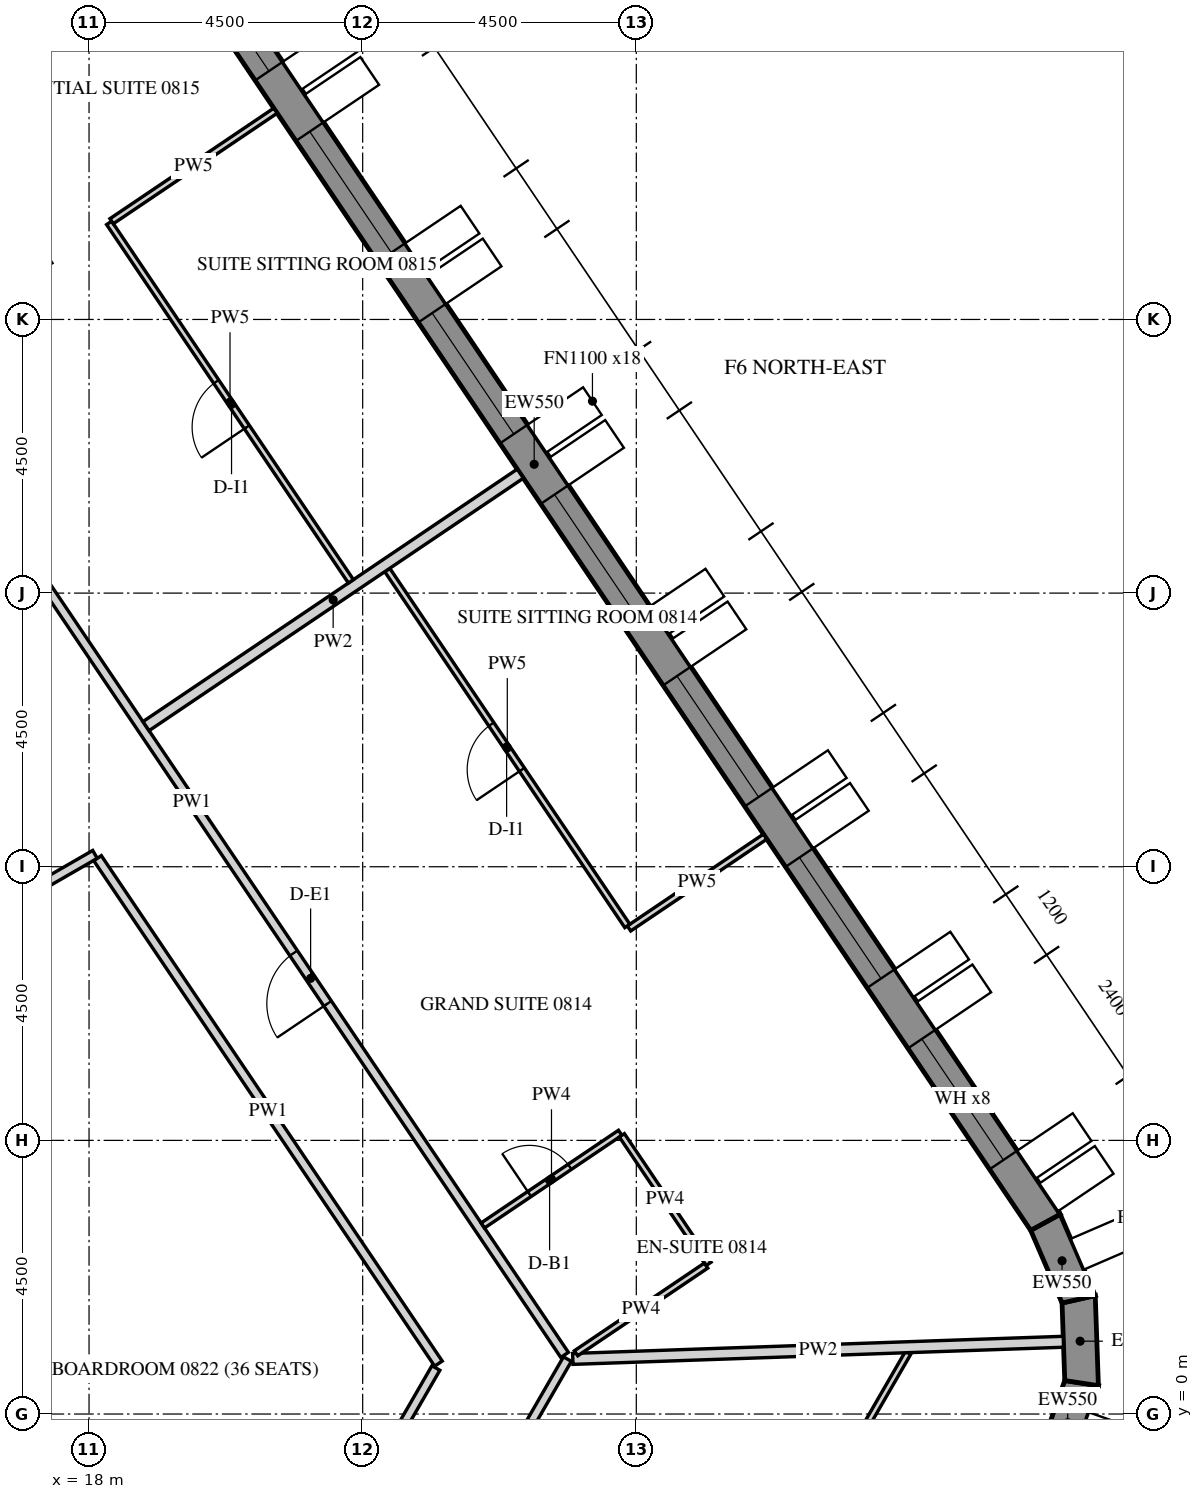
"""IFC4 building model, lengths in metres.
Left out: names, types, materials, properties, quantities, classifications, styles, units other than length and angle.
Written with IfcOpenShell. Run it as: python <this file> out.ifc"""

import sys

from ifc_helpers import new_model, si_unit, direction, frame, frame_2d, origin, place, context, subcontext, project, spatial, polyline, rectangle, outline, extrude, element, fill, save


model = new_model("IFC4")
c1 = context("Model", 3, precision=1e-05, world=origin(), true_north=direction((0.0, 1.0)))
c2 = subcontext(c1, "Body", "Model", "MODEL_VIEW")
j1 = project(units=[si_unit("LENGTHUNIT", "METRE"), si_unit("PLANEANGLEUNIT", "RADIAN")], contexts=[c1])
p1 = place(None, origin())
s1 = spatial("IfcSite", under=j1, at=p1, CompositionType="ELEMENT")
p2 = place(p1, origin())
s2 = spatial("IfcBuilding", under=s1, at=p2, CompositionType="ELEMENT")
p3 = place(p2, frame((0.0, 0.0, 111.6)))
s3 = spatial("IfcBuildingStorey", under=s2, at=p3, CompositionType="ELEMENT", Elevation=111.6)
p4 = place(p3, frame((33.866, -0.792, -0.15), z_axis=(0.0, 0.0, 1.0), x_axis=(0.33111537203, 0.943590276765, 0.0)))
e1 = element("IfcWall", 1, at=p4, inside=s3, PredefinedType="SOLIDWALL", context=c2, shape_type="SweptSolid", body=[
    extrude(outline(polyline([(-0.026, -0.275), (1.431, -0.275), (1.327, 0.275), (0.026, 0.275), (-0.026, -0.275)])), origin(), (0.0, 0.0, 1.0), 3.9),
])
p5 = place(p3, frame((34.323, 0.509, -0.15), z_axis=(0.0, 0.0, 1.0), x_axis=(-0.034876908462, 0.999391615562, 0.0)))
e2 = element("IfcWall", 2, at=p5, inside=s3, PredefinedType="SOLIDWALL", context=c2, shape_type="SweptSolid", body=[
    extrude(outline(polyline([(-0.052, -0.275), (1.431, -0.275), (1.327, 0.275), (0.052, 0.275), (-0.052, -0.275)])), origin(), (0.0, 0.0, 1.0), 3.9),
])
p6 = place(p3, frame((34.274, 1.887, -0.15), z_axis=(0.0, 0.0, 1.0), x_axis=(-0.396161342798, 0.918180913803, 0.0)))
e3 = element("IfcWall", 3, at=p6, inside=s3, PredefinedType="SOLIDWALL", context=c2, shape_type="SweptSolid", body=[
    extrude(outline(polyline([(-0.052, -0.275), (1.405, -0.275), (1.354, 0.275), (0.052, 0.275), (-0.052, -0.275)])), origin(), (0.0, 0.0, 1.0), 3.9),
])
p7 = place(p3, frame((33.728, 3.153, -0.15), z_axis=(0.0, 0.0, 1.0), x_axis=(-0.559192411416, 0.82903790445, 0.0)))
e4 = element("IfcWall", 4, at=p7, inside=s3, PredefinedType="SOLIDWALL", context=c2, shape_type="SweptSolid", body=[
    extrude(outline(polyline([(-0.026, -0.275), (30.093, -0.275), (30.048, 0.275), (0.026, 0.275), (-0.026, -0.275)])), origin(), (0.0, 0.0, 1.0), 3.9),
])
p8 = place(p7, frame((1.236, 0.0, 1.05)))
e5 = element("IfcOpeningElement", 5, at=p8, cuts=e4, PredefinedType="OPENING", context=c2, shape_type="SweptSolid", body=[
    extrude(rectangle(XDim=2.4, YDim=2.4, at=frame_2d((1.2, 1.2))), frame((0.0, 0.285, 0.0), z_axis=(0.0, -1.0, 0.0), x_axis=(1.0, 0.0, 0.0)), (0.0, 0.0, 1.0), 0.57),
])
p9 = place(p7, frame((4.835, 0.0, 1.05)))
e6 = element("IfcOpeningElement", 6, at=p9, cuts=e4, PredefinedType="OPENING", context=c2, shape_type="SweptSolid", body=[
    extrude(rectangle(XDim=2.4, YDim=2.4, at=frame_2d((1.2, 1.2))), frame((0.0, 0.285, 0.0), z_axis=(0.0, -1.0, 0.0), x_axis=(1.0, 0.0, 0.0)), (0.0, 0.0, 1.0), 0.57),
])
p10 = place(p7, frame((8.436, 0.0, 1.05)))
e7 = element("IfcOpeningElement", 7, at=p10, cuts=e4, PredefinedType="OPENING", context=c2, shape_type="SweptSolid", body=[
    extrude(rectangle(XDim=2.4, YDim=2.4, at=frame_2d((1.2, 1.2))), frame((0.0, 0.285, 0.0), z_axis=(0.0, -1.0, 0.0), x_axis=(1.0, 0.0, 0.0)), (0.0, 0.0, 1.0), 0.57),
])
p11 = place(p7, frame((12.035, 0.0, 1.05)))
e8 = element("IfcOpeningElement", 8, at=p11, cuts=e4, PredefinedType="OPENING", context=c2, shape_type="SweptSolid", body=[
    extrude(rectangle(XDim=2.4, YDim=2.4, at=frame_2d((1.2, 1.2))), frame((0.0, 0.285, 0.0), z_axis=(0.0, -1.0, 0.0), x_axis=(1.0, 0.0, 0.0)), (0.0, 0.0, 1.0), 0.57),
])
p12 = place(p7, frame((15.635, 0.0, 1.05)))
e9 = element("IfcOpeningElement", 9, at=p12, cuts=e4, PredefinedType="OPENING", context=c2, shape_type="SweptSolid", body=[
    extrude(rectangle(XDim=2.4, YDim=2.4, at=frame_2d((1.2, 1.2))), frame((0.0, 0.285, 0.0), z_axis=(0.0, -1.0, 0.0), x_axis=(1.0, 0.0, 0.0)), (0.0, 0.0, 1.0), 0.57),
])
p13 = place(p7, frame((19.236, 0.0, 1.05)))
e10 = element("IfcOpeningElement", 10, at=p13, cuts=e4, PredefinedType="OPENING", context=c2, shape_type="SweptSolid", body=[
    extrude(rectangle(XDim=2.4, YDim=2.4, at=frame_2d((1.2, 1.2))), frame((0.0, 0.285, 0.0), z_axis=(0.0, -1.0, 0.0), x_axis=(1.0, 0.0, 0.0)), (0.0, 0.0, 1.0), 0.57),
])
p14 = place(p7, frame((22.835, 0.0, 1.05)))
e11 = element("IfcOpeningElement", 11, at=p14, cuts=e4, PredefinedType="OPENING", context=c2, shape_type="SweptSolid", body=[
    extrude(rectangle(XDim=2.4, YDim=2.4, at=frame_2d((1.2, 1.2))), frame((0.0, 0.285, 0.0), z_axis=(0.0, -1.0, 0.0), x_axis=(1.0, 0.0, 0.0)), (0.0, 0.0, 1.0), 0.57),
])
p15 = place(p7, frame((26.436, 0.0, 1.05)))
e12 = element("IfcOpeningElement", 12, at=p15, cuts=e4, PredefinedType="OPENING", context=c2, shape_type="SweptSolid", body=[
    extrude(rectangle(XDim=2.4, YDim=2.4, at=frame_2d((1.2, 1.2))), frame((0.0, 0.285, 0.0), z_axis=(0.0, -1.0, 0.0), x_axis=(1.0, 0.0, 0.0)), (0.0, 0.0, 1.0), 0.57),
])
p16 = place(p3, frame((13.928, -19.775, 0.0), z_axis=(0.0, 0.0, 1.0), x_axis=(0.50000450071, 0.866022805283, 0.0)))
e13 = element("IfcWall", 13, at=p16, inside=s3, PredefinedType="PARTITIONING", context=c2, shape_type="SweptSolid", body=[
    extrude(rectangle(XDim=23.877, YDim=0.15, at=frame_2d((11.938, 0.0))), origin(), (0.0, 0.0, 1.0), 2.988),
])
p17 = place(p16, frame((3.843, 0.0, 0.0)))
e14 = element("IfcOpeningElement", 14, at=p17, cuts=e13, PredefinedType="OPENING", context=c2, shape_type="SweptSolid", body=[
    extrude(rectangle(XDim=1.0, YDim=2.1, at=frame_2d((0.5, 1.05))), frame((0.0, 0.085, 0.0), z_axis=(0.0, -1.0, 0.0), x_axis=(1.0, 0.0, 0.0)), (0.0, 0.0, 1.0), 0.17),
])
p18 = place(p16, frame((18.425, 0.0, 0.0)))
e15 = element("IfcOpeningElement", 15, at=p18, cuts=e13, PredefinedType="OPENING", context=c2, shape_type="SweptSolid", body=[
    extrude(rectangle(XDim=1.0, YDim=2.1, at=frame_2d((0.5, 1.05))), frame((0.0, 0.085, 0.0), z_axis=(0.0, -1.0, 0.0), x_axis=(1.0, 0.0, 0.0)), (0.0, 0.0, 1.0), 0.17),
])
p19 = place(p3, frame((25.821, 0.972, 0.0), z_axis=(0.0, 0.0, 1.0), x_axis=(-0.559192946342, 0.829037543638, 0.0)))
e16 = element("IfcWall", 16, at=p19, inside=s3, PredefinedType="PARTITIONING", context=c2, shape_type="SweptSolid", body=[
    extrude(rectangle(XDim=21.918, YDim=0.15, at=frame_2d((10.959, 0.0))), origin(), (0.0, 0.0, 1.0), 2.988),
])
p20 = place(p19, frame((6.969, 0.0, 0.0)))
e17 = element("IfcOpeningElement", 17, at=p20, cuts=e16, PredefinedType="OPENING", context=c2, shape_type="SweptSolid", body=[
    extrude(rectangle(XDim=1.0, YDim=2.1, at=frame_2d((0.5, 1.05))), frame((0.0, 0.085, 0.0), z_axis=(0.0, -1.0, 0.0), x_axis=(1.0, 0.0, 0.0)), (0.0, 0.0, 1.0), 0.17),
])
p21 = place(p19, frame((15.511, 0.0, 0.0)))
e18 = element("IfcOpeningElement", 18, at=p21, cuts=e16, PredefinedType="OPENING", context=c2, shape_type="SweptSolid", body=[
    extrude(rectangle(XDim=1.0, YDim=2.1, at=frame_2d((0.5, 1.05))), frame((0.0, 0.085, 0.0), z_axis=(0.0, -1.0, 0.0), x_axis=(1.0, 0.0, 0.0)), (0.0, 0.0, 1.0), 0.17),
])
p22 = place(p3, frame((12.664, 6.066, 0.0), z_axis=(0.0, 0.0, 1.0), x_axis=(0.866036561919, 0.499980673046, 0.0)))
e19 = element("IfcWall", 19, at=p22, inside=s3, PredefinedType="PARTITIONING", context=c2, shape_type="SweptSolid", body=[
    extrude(rectangle(XDim=6.275, YDim=0.15, at=frame_2d((3.137, 0.0))), origin(), (0.0, 0.0, 1.0), 2.988),
])
p23 = place(p3, frame((18.14, 9.141, 0.0), z_axis=(0.0, 0.0, 1.0), x_axis=(0.55918799196, -0.829040885389, 0.0)))
e20 = element("IfcWall", 20, at=p23, inside=s3, PredefinedType="PARTITIONING", context=c2, shape_type="SweptSolid", body=[
    extrude(rectangle(XDim=10.025, YDim=0.15, at=frame_2d((5.013, 0.0))), origin(), (0.0, 0.0, 1.0), 2.988),
])
p24 = place(p3, frame((23.704, 0.757, 0.0), z_axis=(0.0, 0.0, 1.0), x_axis=(-0.500010297365, -0.866019458516, 0.0)))
e21 = element("IfcWall", 21, at=p24, inside=s3, PredefinedType="PARTITIONING", context=c2, shape_type="SweptSolid", body=[
    extrude(rectangle(XDim=11.429, YDim=0.15, at=frame_2d((5.714, 0.0))), origin(), (0.0, 0.0, 1.0), 2.988),
])
p25 = place(p24, frame((5.264, 0.0, 0.0)))
e22 = element("IfcOpeningElement", 22, at=p25, cuts=e21, PredefinedType="OPENING", context=c2, shape_type="SweptSolid", body=[
    extrude(rectangle(XDim=0.9, YDim=2.1, at=frame_2d((0.45, 1.05))), frame((0.0, 0.085, 0.0), z_axis=(0.0, -1.0, 0.0), x_axis=(1.0, 0.0, 0.0)), (0.0, 0.0, 1.0), 0.17),
])
p26 = place(p3, frame((27.397, -6.048, 0.0), z_axis=(0.0, 0.0, 1.0), x_axis=(0.49998354646, 0.866034903032, 0.0)))
e23 = element("IfcWall", 23, at=p26, inside=s3, PredefinedType="PARTITIONING", context=c2, shape_type="SweptSolid", body=[
    extrude(rectangle(XDim=8.148, YDim=0.1, at=frame_2d((4.074, 0.0))), origin(), (0.0, 0.0, 1.0), 2.988),
])
p27 = place(p26, frame((3.1, 0.0, 0.0)))
e24 = element("IfcOpeningElement", 24, at=p27, cuts=e23, PredefinedType="OPENING", context=c2, shape_type="SweptSolid", body=[
    extrude(rectangle(XDim=0.9, YDim=2.1, at=frame_2d((0.45, 1.05))), frame((0.0, 0.06, 0.0), z_axis=(0.0, -1.0, 0.0), x_axis=(1.0, 0.0, 0.0)), (0.0, 0.0, 1.0), 0.12),
])
p28 = place(p3, frame((34.023, 1.188, 0.0), z_axis=(0.0, 0.0, 1.0), x_axis=(-0.999390818315, -0.03489974594, 0.0)))
e25 = element("IfcWall", 25, at=p28, inside=s3, PredefinedType="PARTITIONING", context=c2, shape_type="SweptSolid", body=[
    extrude(rectangle(XDim=8.073, YDim=0.18, at=frame_2d((4.036, 0.0))), origin(), (0.0, 0.0, 1.0), 2.988),
])
p29 = place(p3, frame((24.476, 3.101, 0.0), z_axis=(0.0, 0.0, 1.0), x_axis=(0.829047014003, 0.559178905694, 0.0)))
e26 = element("IfcWall", 26, at=p29, inside=s3, PredefinedType="PARTITIONING", context=c2, shape_type="SweptSolid", body=[
    extrude(rectangle(XDim=2.725, YDim=0.1, at=frame_2d((1.362, 0.0))), origin(), (0.0, 0.0, 1.0), 2.988),
])
p30 = place(p29, frame((0.925, 0.0, 0.0)))
e27 = element("IfcOpeningElement", 27, at=p30, cuts=e26, PredefinedType="OPENING", context=c2, shape_type="SweptSolid", body=[
    extrude(rectangle(XDim=0.8, YDim=2.1, at=frame_2d((0.4, 1.05))), frame((0.0, 0.06, 0.0), z_axis=(0.0, -1.0, 0.0), x_axis=(1.0, 0.0, 0.0)), (0.0, 0.0, 1.0), 0.12),
])
p31 = place(p3, frame((26.762, 4.583, 0.0), z_axis=(0.0, 0.0, 1.0), x_axis=(0.559221247909, -0.829018453285, 0.0)))
e28 = element("IfcWall", 28, at=p31, inside=s3, PredefinedType="PARTITIONING", context=c2, shape_type="SweptSolid", body=[
    extrude(rectangle(XDim=2.55, YDim=0.1, at=frame_2d((1.275, 0.0))), origin(), (0.0, 0.0, 1.0), 2.988),
])
p32 = place(p3, frame((28.147, 2.441, 0.0), z_axis=(0.0, 0.0, 1.0), x_axis=(-0.829023136679, -0.559214304941, 0.0)))
e29 = element("IfcWall", 29, at=p32, inside=s3, PredefinedType="PARTITIONING", context=c2, shape_type="SweptSolid", body=[
    extrude(rectangle(XDim=2.579, YDim=0.1, at=frame_2d((1.29, 0.0))), origin(), (0.0, 0.0, 1.0), 2.988),
])
p33 = place(p3, frame((29.119, 9.495, 0.0), z_axis=(0.0, 0.0, 1.0), x_axis=(-0.829061405999, -0.559157567313, 0.0)))
e30 = element("IfcWall", 30, at=p33, inside=s3, PredefinedType="PARTITIONING", context=c2, shape_type="SweptSolid", body=[
    extrude(rectangle(XDim=2.7, YDim=0.1, at=frame_2d((1.35, 0.0))), origin(), (0.0, 0.0, 1.0), 2.988),
])
p34 = place(p3, frame((26.852, 8.027, 0.0), z_axis=(0.0, 0.0, 1.0), x_axis=(-0.559216845309, 0.829021423078, 0.0)))
e31 = element("IfcWall", 31, at=p34, inside=s3, PredefinedType="PARTITIONING", context=c2, shape_type="SweptSolid", body=[
    extrude(rectangle(XDim=7.06, YDim=0.1, at=frame_2d((3.53, 0.0))), origin(), (0.0, 0.0, 1.0), 2.988),
])
p35 = place(p34, frame((3.1, 0.0, 0.0)))
e32 = element("IfcOpeningElement", 32, at=p35, cuts=e31, PredefinedType="OPENING", context=c2, shape_type="SweptSolid", body=[
    extrude(rectangle(XDim=0.9, YDim=2.1, at=frame_2d((0.45, 1.05))), frame((0.0, 0.06, 0.0), z_axis=(0.0, -1.0, 0.0), x_axis=(1.0, 0.0, 0.0)), (0.0, 0.0, 1.0), 0.12),
])
p36 = place(p3, frame((25.092, 15.464, 0.0), z_axis=(0.0, 0.0, 1.0), x_axis=(-0.829043414408, -0.559184242471, 0.0)))
e33 = element("IfcWall", 33, at=p36, inside=s3, PredefinedType="PARTITIONING", context=c2, shape_type="SweptSolid", body=[
    extrude(rectangle(XDim=7.425, YDim=0.18, at=frame_2d((3.712, 0.0))), origin(), (0.0, 0.0, 1.0), 2.988),
])
p37 = place(p3, frame((22.306, 13.693, 0.0), z_axis=(0.0, 0.0, 1.0), x_axis=(-0.559185029686, 0.829042883435, 0.0)))
e34 = element("IfcWall", 34, at=p37, inside=s3, PredefinedType="PARTITIONING", context=c2, shape_type="SweptSolid", body=[
    extrude(rectangle(XDim=7.11, YDim=0.1, at=frame_2d((3.555, 0.0))), origin(), (0.0, 0.0, 1.0), 2.988),
])
p38 = place(p37, frame((3.06, 0.0, 0.0)))
e35 = element("IfcOpeningElement", 35, at=p38, cuts=e34, PredefinedType="OPENING", context=c2, shape_type="SweptSolid", body=[
    extrude(rectangle(XDim=0.9, YDim=2.1, at=frame_2d((0.45, 1.05))), frame((0.0, 0.06, 0.0), z_axis=(0.0, -1.0, 0.0), x_axis=(1.0, 0.0, 0.0)), (0.0, 0.0, 1.0), 0.12),
])
p39 = place(p3, frame((18.372, 19.616, 0.0), z_axis=(0.0, 0.0, 1.0), x_axis=(0.829033253898, 0.55919930609, 0.0)))
e36 = element("IfcWall", 36, at=p39, inside=s3, PredefinedType="PARTITIONING", context=c2, shape_type="SweptSolid", body=[
    extrude(rectangle(XDim=3.25, YDim=0.1, at=frame_2d((1.625, 0.0))), origin(), (0.0, 0.0, 1.0), 2.988),
])
p40 = place(p8, frame((0.0, 0.205, 0.0)))
e37 = element("IfcWindow", 37, at=p40, inside=s3, PartitioningType="DOUBLE_PANEL_VERTICAL", PredefinedType="WINDOW", context=c2, shape_type="SweptSolid", body=[
    extrude(rectangle(XDim=2.4, YDim=2.4, at=frame_2d((1.2, 1.2))), frame((0.0, 0.03, 0.0), z_axis=(0.0, -1.0, 0.0), x_axis=(1.0, 0.0, 0.0)), (0.0, 0.0, 1.0), 0.06),
])
fill(e5, e37)
p41 = place(p9, frame((0.0, 0.205, 0.0)))
e38 = element("IfcWindow", 38, at=p41, inside=s3, PartitioningType="DOUBLE_PANEL_VERTICAL", PredefinedType="WINDOW", context=c2, shape_type="SweptSolid", body=[
    extrude(rectangle(XDim=2.4, YDim=2.4, at=frame_2d((1.2, 1.2))), frame((0.0, 0.03, 0.0), z_axis=(0.0, -1.0, 0.0), x_axis=(1.0, 0.0, 0.0)), (0.0, 0.0, 1.0), 0.06),
])
fill(e6, e38)
p42 = place(p10, frame((0.0, 0.205, 0.0)))
e39 = element("IfcWindow", 39, at=p42, inside=s3, PartitioningType="DOUBLE_PANEL_VERTICAL", PredefinedType="WINDOW", context=c2, shape_type="SweptSolid", body=[
    extrude(rectangle(XDim=2.4, YDim=2.4, at=frame_2d((1.2, 1.2))), frame((0.0, 0.03, 0.0), z_axis=(0.0, -1.0, 0.0), x_axis=(1.0, 0.0, 0.0)), (0.0, 0.0, 1.0), 0.06),
])
fill(e7, e39)
p43 = place(p11, frame((0.0, 0.205, 0.0)))
e40 = element("IfcWindow", 40, at=p43, inside=s3, PartitioningType="DOUBLE_PANEL_VERTICAL", PredefinedType="WINDOW", context=c2, shape_type="SweptSolid", body=[
    extrude(rectangle(XDim=2.4, YDim=2.4, at=frame_2d((1.2, 1.2))), frame((0.0, 0.03, 0.0), z_axis=(0.0, -1.0, 0.0), x_axis=(1.0, 0.0, 0.0)), (0.0, 0.0, 1.0), 0.06),
])
fill(e8, e40)
p44 = place(p12, frame((0.0, 0.205, 0.0)))
e41 = element("IfcWindow", 41, at=p44, inside=s3, PartitioningType="DOUBLE_PANEL_VERTICAL", PredefinedType="WINDOW", context=c2, shape_type="SweptSolid", body=[
    extrude(rectangle(XDim=2.4, YDim=2.4, at=frame_2d((1.2, 1.2))), frame((0.0, 0.03, 0.0), z_axis=(0.0, -1.0, 0.0), x_axis=(1.0, 0.0, 0.0)), (0.0, 0.0, 1.0), 0.06),
])
fill(e9, e41)
p45 = place(p13, frame((0.0, 0.205, 0.0)))
e42 = element("IfcWindow", 42, at=p45, inside=s3, PartitioningType="DOUBLE_PANEL_VERTICAL", PredefinedType="WINDOW", context=c2, shape_type="SweptSolid", body=[
    extrude(rectangle(XDim=2.4, YDim=2.4, at=frame_2d((1.2, 1.2))), frame((0.0, 0.03, 0.0), z_axis=(0.0, -1.0, 0.0), x_axis=(1.0, 0.0, 0.0)), (0.0, 0.0, 1.0), 0.06),
])
fill(e10, e42)
p46 = place(p14, frame((0.0, 0.205, 0.0)))
e43 = element("IfcWindow", 43, at=p46, inside=s3, PartitioningType="DOUBLE_PANEL_VERTICAL", PredefinedType="WINDOW", context=c2, shape_type="SweptSolid", body=[
    extrude(rectangle(XDim=2.4, YDim=2.4, at=frame_2d((1.2, 1.2))), frame((0.0, 0.03, 0.0), z_axis=(0.0, -1.0, 0.0), x_axis=(1.0, 0.0, 0.0)), (0.0, 0.0, 1.0), 0.06),
])
fill(e11, e43)
p47 = place(p20, origin())
e44 = element("IfcDoor", 44, at=p47, inside=s3, OperationType="SINGLE_SWING_RIGHT", PredefinedType="DOOR", context=c2, shape_type="SweptSolid", body=[
    extrude(rectangle(XDim=1.0, YDim=2.1, at=frame_2d((0.5, 1.05))), frame((0.0, 0.025, 0.0), z_axis=(0.0, -1.0, 0.0), x_axis=(1.0, 0.0, 0.0)), (0.0, 0.0, 1.0), 0.05),
])
fill(e17, e44)
p48 = place(p30, origin())
e45 = element("IfcDoor", 45, at=p48, inside=s3, OperationType="SINGLE_SWING_RIGHT", PredefinedType="DOOR", context=c2, shape_type="SweptSolid", body=[
    extrude(rectangle(XDim=0.8, YDim=2.1, at=frame_2d((0.4, 1.05))), frame((0.0, 0.025, 0.0), z_axis=(0.0, -1.0, 0.0), x_axis=(1.0, 0.0, 0.0)), (0.0, 0.0, 1.0), 0.05),
])
fill(e27, e45)
p49 = place(p35, origin())
e46 = element("IfcDoor", 46, at=p49, inside=s3, OperationType="SINGLE_SWING_RIGHT", PredefinedType="DOOR", context=c2, shape_type="SweptSolid", body=[
    extrude(rectangle(XDim=0.9, YDim=2.1, at=frame_2d((0.45, 1.05))), frame((0.0, 0.025, 0.0), z_axis=(0.0, -1.0, 0.0), x_axis=(1.0, 0.0, 0.0)), (0.0, 0.0, 1.0), 0.05),
])
fill(e32, e46)
p50 = place(p38, origin())
e47 = element("IfcDoor", 47, at=p50, inside=s3, OperationType="SINGLE_SWING_RIGHT", PredefinedType="DOOR", context=c2, shape_type="SweptSolid", body=[
    extrude(rectangle(XDim=0.9, YDim=2.1, at=frame_2d((0.45, 1.05))), frame((0.0, 0.025, 0.0), z_axis=(0.0, -1.0, 0.0), x_axis=(1.0, 0.0, 0.0)), (0.0, 0.0, 1.0), 0.05),
])
fill(e35, e47)
save(model, sys.argv[1])
